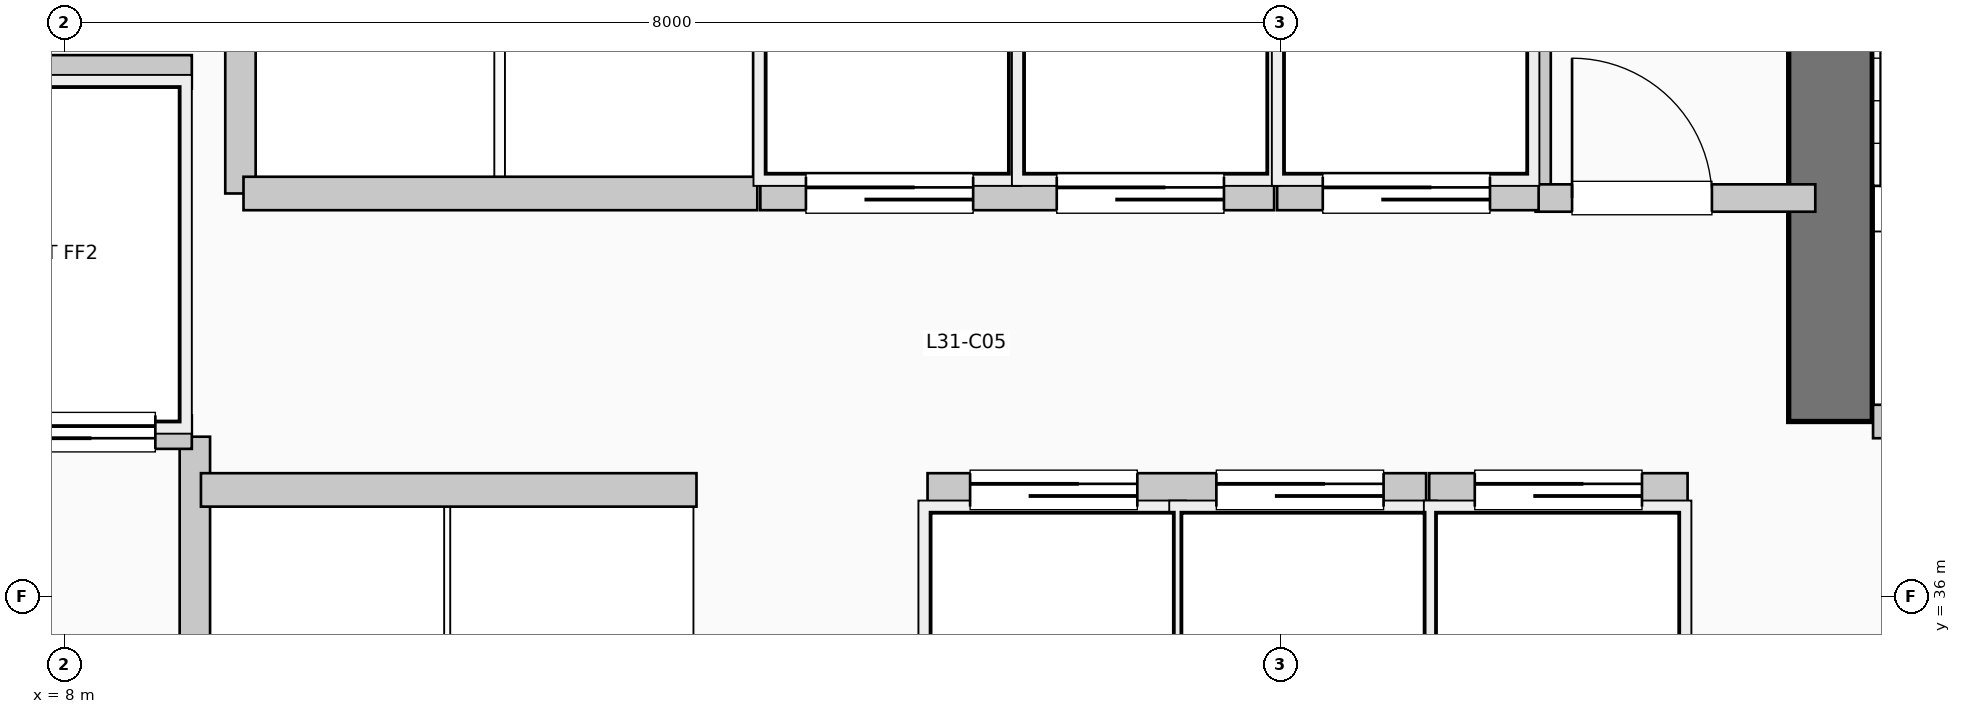
"""IFC4 building model, lengths in metres.
Left out: names, types, materials, properties, quantities, classifications, styles, units other than length and angle.
Written with IfcOpenShell. Run it as: python <this file> out.ifc"""

import sys

from ifc_helpers import new_model, si_unit, direction, frame, frame_2d, origin, place, context, subcontext, project, spatial, rectangle, extrude, element, fill, save


model = new_model("IFC4")
c1 = context("Model", 3, precision=1e-05, world=origin(), true_north=direction((0.0, 1.0)))
c2 = subcontext(c1, "Body", "Model", "MODEL_VIEW")
j1 = project(units=[si_unit("LENGTHUNIT", "METRE"), si_unit("PLANEANGLEUNIT", "RADIAN")], contexts=[c1])
p1 = place(None, origin())
s1 = spatial("IfcSite", under=j1, at=p1, CompositionType="ELEMENT")
p2 = place(p1, origin())
s2 = spatial("IfcBuilding", under=s1, at=p2, CompositionType="ELEMENT")
p3 = place(p2, frame((0.0, 0.0, 130.35)))
s3 = spatial("IfcBuildingStorey", under=s2, at=p3, CompositionType="ELEMENT", Elevation=130.35)
p4 = place(p3, frame((19.62, 37.15, 0.0), z_axis=(0.0, 0.0, 1.0), x_axis=(0.0, 1.0, 0.0)))
e1 = element("IfcWall", 1, at=p4, inside=s3, PredefinedType="SHEAR", context=c2, shape_type="SweptSolid", body=[
    extrude(rectangle(XDim=7.89, YDim=0.55, at=frame_2d((3.945, 0.0))), origin(), (0.0, 0.0, 1.0), 4.62),
])
p5 = place(p3, frame((8.86, 34.55, 0.0), z_axis=(0.0, 0.0, 1.0), x_axis=(0.0, 1.0, 0.0)))
e2 = element("IfcWall", 2, at=p5, inside=s3, PredefinedType="PARTITIONING", context=c2, shape_type="SweptSolid", body=[
    extrude(rectangle(XDim=2.5, YDim=0.2, at=frame_2d((1.25, 0.0))), origin(), (0.0, 0.0, 1.0), 4.37),
])
p6 = place(p3, frame((19.9, 37.15, 0.0), z_axis=(0.0, 0.0, 1.0), x_axis=(1.0, 0.0, 0.0)))
e3 = element("IfcWall", 3, at=p6, inside=s3, PredefinedType="PARTITIONING", context=c2, shape_type="SweptSolid", body=[
    extrude(rectangle(XDim=3.15, YDim=0.22, at=frame_2d((1.575, 0.0))), origin(), (0.0, 0.0, 1.0), 4.37),
])
p7 = place(p6, frame((2.05, 0.0, 0.0), z_axis=(0.0, 0.0, 1.0), x_axis=(-1.0, 0.0, 0.0)))
e4 = element("IfcOpeningElement", 4, at=p7, cuts=e3, PredefinedType="OPENING", context=c2, shape_type="SweptSolid", body=[
    extrude(rectangle(XDim=1.05, YDim=2.15, at=frame_2d((0.525, 1.075))), frame((0.0, 0.12, 0.0), z_axis=(0.0, -1.0, 0.0), x_axis=(1.0, 0.0, 0.0)), (0.0, 0.0, 1.0), 0.24),
])
p8 = place(p3, frame((5.38, 37.08, 0.0), z_axis=(0.0, 0.0, 1.0), x_axis=(1.0, 0.0, 0.0)))
e5 = element("IfcWall", 5, at=p8, inside=s3, PredefinedType="PARTITIONING", context=c2, shape_type="SweptSolid", body=[
    extrude(rectangle(XDim=3.46, YDim=0.22, at=frame_2d((1.73, 0.0))), origin(), (0.0, 0.0, 1.0), 4.37),
])
p9 = place(p8, frame((1.55, 0.0, 0.0), z_axis=(0.0, 0.0, 1.0), x_axis=(-1.0, 0.0, 0.0)))
e6 = element("IfcOpeningElement", 6, at=p9, cuts=e5, PredefinedType="OPENING", context=c2, shape_type="SweptSolid", body=[
    extrude(rectangle(XDim=1.2, YDim=2.2, at=frame_2d((0.6, 1.1))), frame((0.0, 0.12, 0.0), z_axis=(0.0, -1.0, 0.0), x_axis=(1.0, 0.0, 0.0)), (0.0, 0.0, 1.0), 0.24),
])
p10 = place(p8, frame((3.22, 0.0, 0.0), z_axis=(0.0, 0.0, 1.0), x_axis=(-1.0, 0.0, 0.0)))
e7 = element("IfcOpeningElement", 7, at=p10, cuts=e5, PredefinedType="OPENING", context=c2, shape_type="SweptSolid", body=[
    extrude(rectangle(XDim=1.2, YDim=2.2, at=frame_2d((0.6, 1.1))), frame((0.0, 0.12, 0.0), z_axis=(0.0, -1.0, 0.0), x_axis=(1.0, 0.0, 0.0)), (0.0, 0.0, 1.0), 0.24),
])
p11 = place(p3, frame((5.38, 39.45, 0.0), z_axis=(0.0, 0.0, 1.0), x_axis=(1.0, 0.0, 0.0)))
e8 = element("IfcWall", 8, at=p11, inside=s3, PredefinedType="PARTITIONING", context=c2, shape_type="SweptSolid", body=[
    extrude(rectangle(XDim=3.46, YDim=0.22, at=frame_2d((1.73, 0.0))), origin(), (0.0, 0.0, 1.0), 4.37),
])
for number, where, z_axis, x_axis in (
    (9, (9.16, 38.65, 0.0), (0.0, 0.0, 1.0), (0.0, 1.0, 0.0)),
    (10, (17.68, 38.65, 0.0), (0.0, 0.0, 1.0), (0.0, 1.0, 0.0)),
):
    element("IfcWall", number, at=place(p3, frame(where, z_axis=z_axis, x_axis=x_axis)), inside=s3, PredefinedType="PARTITIONING", context=c2, shape_type="SweptSolid", body=[
        extrude(rectangle(XDim=2.35, YDim=0.2, at=frame_2d((1.175, 0.0))), origin(), (0.0, 0.0, 1.0), 4.37),
    ])
p12 = place(p3, frame((17.68, 38.62, 0.0), z_axis=(0.0, 0.0, 1.0), x_axis=(1.0, 0.0, 0.0)))
e11 = element("IfcWall", 11, at=p12, inside=s3, PredefinedType="PARTITIONING", context=c2, shape_type="SweptSolid", body=[
    extrude(rectangle(XDim=1.84, YDim=0.18, at=frame_2d((0.92, 0.0))), origin(), (0.0, 0.0, 1.0), 4.37),
])
p13 = place(p12, frame((0.24, 0.0, 0.0)))
e12 = element("IfcOpeningElement", 12, at=p13, cuts=e11, PredefinedType="OPENING", context=c2, shape_type="SweptSolid", body=[
    extrude(rectangle(XDim=0.92, YDim=2.1, at=frame_2d((0.46, 1.05))), frame((0.0, 0.1, 0.0), z_axis=(0.0, -1.0, 0.0), x_axis=(1.0, 0.0, 0.0)), (0.0, 0.0, 1.0), 0.2),
])
p14 = place(p3, frame((8.9, 36.7, 0.0), z_axis=(0.0, 0.0, 1.0), x_axis=(1.0, 0.0, 0.0)))
e13 = element("IfcWall", 13, at=p14, inside=s3, PredefinedType="PARTITIONING", context=c2, shape_type="SweptSolid", body=[
    extrude(rectangle(XDim=3.26, YDim=0.22, at=frame_2d((1.63, 0.0))), origin(), (0.0, 0.0, 1.0), 4.37),
])
p15 = place(p3, frame((9.18, 38.65, 0.0), z_axis=(0.0, 0.0, 1.0), x_axis=(1.0, 0.0, 0.0)))
e14 = element("IfcWall", 14, at=p15, inside=s3, PredefinedType="PARTITIONING", context=c2, shape_type="SweptSolid", body=[
    extrude(rectangle(XDim=3.38, YDim=0.22, at=frame_2d((1.69, 0.0))), origin(), (0.0, 0.0, 1.0), 4.37),
])
p16 = place(p3, frame((13.68, 36.7, 0.0), z_axis=(0.0, 0.0, 1.0), x_axis=(1.0, 0.0, 0.0)))
e15 = element("IfcWall", 15, at=p16, inside=s3, PredefinedType="PARTITIONING", context=c2, shape_type="SweptSolid", body=[
    extrude(rectangle(XDim=3.28, YDim=0.22, at=frame_2d((1.64, 0.0))), origin(), (0.0, 0.0, 1.0), 4.37),
])
p17 = place(p16, frame((0.28, 0.0, 0.0)))
e16 = element("IfcOpeningElement", 16, at=p17, cuts=e15, PredefinedType="OPENING", context=c2, shape_type="SweptSolid", body=[
    extrude(rectangle(XDim=1.1, YDim=2.2, at=frame_2d((0.55, 1.1))), frame((0.0, 0.12, 0.0), z_axis=(0.0, -1.0, 0.0), x_axis=(1.0, 0.0, 0.0)), (0.0, 0.0, 1.0), 0.24),
])
p18 = place(p16, frame((1.9, 0.0, 0.0)))
e17 = element("IfcOpeningElement", 17, at=p18, cuts=e15, PredefinedType="OPENING", context=c2, shape_type="SweptSolid", body=[
    extrude(rectangle(XDim=1.1, YDim=2.2, at=frame_2d((0.55, 1.1))), frame((0.0, 0.12, 0.0), z_axis=(0.0, -1.0, 0.0), x_axis=(1.0, 0.0, 0.0)), (0.0, 0.0, 1.0), 0.24),
])
p19 = place(p3, frame((12.58, 38.65, 0.0), z_axis=(0.0, 0.0, 1.0), x_axis=(1.0, 0.0, 0.0)))
e18 = element("IfcWall", 18, at=p19, inside=s3, PredefinedType="PARTITIONING", context=c2, shape_type="SweptSolid", body=[
    extrude(rectangle(XDim=3.38, YDim=0.22, at=frame_2d((1.69, 0.0))), origin(), (0.0, 0.0, 1.0), 4.37),
])
p20 = place(p19, frame((0.3, 0.0, 0.0)))
e19 = element("IfcOpeningElement", 19, at=p20, cuts=e18, PredefinedType="OPENING", context=c2, shape_type="SweptSolid", body=[
    extrude(rectangle(XDim=1.1, YDim=2.2, at=frame_2d((0.55, 1.1))), frame((0.0, 0.12, 0.0), z_axis=(0.0, -1.0, 0.0), x_axis=(1.0, 0.0, 0.0)), (0.0, 0.0, 1.0), 0.24),
])
p21 = place(p19, frame((1.95, 0.0, 0.0)))
e20 = element("IfcOpeningElement", 20, at=p21, cuts=e18, PredefinedType="OPENING", context=c2, shape_type="SweptSolid", body=[
    extrude(rectangle(XDim=1.1, YDim=2.2, at=frame_2d((0.55, 1.1))), frame((0.0, 0.12, 0.0), z_axis=(0.0, -1.0, 0.0), x_axis=(1.0, 0.0, 0.0)), (0.0, 0.0, 1.0), 0.24),
])
p22 = place(p3, frame((16.98, 36.7, 0.0), z_axis=(0.0, 0.0, 1.0), x_axis=(1.0, 0.0, 0.0)))
e21 = element("IfcWall", 21, at=p22, inside=s3, PredefinedType="PARTITIONING", context=c2, shape_type="SweptSolid", body=[
    extrude(rectangle(XDim=1.7, YDim=0.22, at=frame_2d((0.85, 0.0))), origin(), (0.0, 0.0, 1.0), 4.37),
])
p23 = place(p22, frame((0.3, 0.0, 0.0)))
e22 = element("IfcOpeningElement", 22, at=p23, cuts=e21, PredefinedType="OPENING", context=c2, shape_type="SweptSolid", body=[
    extrude(rectangle(XDim=1.1, YDim=2.2, at=frame_2d((0.55, 1.1))), frame((0.0, 0.12, 0.0), z_axis=(0.0, -1.0, 0.0), x_axis=(1.0, 0.0, 0.0)), (0.0, 0.0, 1.0), 0.24),
])
p24 = place(p3, frame((15.98, 38.65, 0.0), z_axis=(0.0, 0.0, 1.0), x_axis=(1.0, 0.0, 0.0)))
e23 = element("IfcWall", 23, at=p24, inside=s3, PredefinedType="PARTITIONING", context=c2, shape_type="SweptSolid", body=[
    extrude(rectangle(XDim=1.72, YDim=0.22, at=frame_2d((0.86, 0.0))), origin(), (0.0, 0.0, 1.0), 4.37),
])
p25 = place(p24, frame((0.3, 0.0, 0.0)))
e24 = element("IfcOpeningElement", 24, at=p25, cuts=e23, PredefinedType="OPENING", context=c2, shape_type="SweptSolid", body=[
    extrude(rectangle(XDim=1.1, YDim=2.2, at=frame_2d((0.55, 1.1))), frame((0.0, 0.12, 0.0), z_axis=(0.0, -1.0, 0.0), x_axis=(1.0, 0.0, 0.0)), (0.0, 0.0, 1.0), 0.24),
])
p26 = place(p10, origin())
e25 = element("IfcDoor", 25, at=p26, inside=s3, OperationType="SLIDING_TO_RIGHT", PredefinedType="DOOR", context=c2, shape_type="SweptSolid", body=[
    extrude(rectangle(XDim=1.2, YDim=2.2, at=frame_2d((0.6, 1.1))), frame((0.0, 0.025, 0.0), z_axis=(0.0, -1.0, 0.0), x_axis=(1.0, 0.0, 0.0)), (0.0, 0.0, 1.0), 0.05),
])
fill(e7, e25)
p27 = place(p13, origin())
e26 = element("IfcDoor", 26, at=p27, inside=s3, OperationType="SINGLE_SWING_LEFT", PredefinedType="DOOR", context=c2, shape_type="SweptSolid", body=[
    extrude(rectangle(XDim=0.92, YDim=2.1, at=frame_2d((0.46, 1.05))), frame((0.0, 0.025, 0.0), z_axis=(0.0, -1.0, 0.0), x_axis=(1.0, 0.0, 0.0)), (0.0, 0.0, 1.0), 0.05),
])
fill(e12, e26)
p28 = place(p17, origin())
e27 = element("IfcDoor", 27, at=p28, inside=s3, OperationType="SLIDING_TO_RIGHT", PredefinedType="DOOR", context=c2, shape_type="SweptSolid", body=[
    extrude(rectangle(XDim=1.1, YDim=2.2, at=frame_2d((0.55, 1.1))), frame((0.0, 0.025, 0.0), z_axis=(0.0, -1.0, 0.0), x_axis=(1.0, 0.0, 0.0)), (0.0, 0.0, 1.0), 0.05),
])
fill(e16, e27)
p29 = place(p18, origin())
e28 = element("IfcDoor", 28, at=p29, inside=s3, OperationType="SLIDING_TO_RIGHT", PredefinedType="DOOR", context=c2, shape_type="SweptSolid", body=[
    extrude(rectangle(XDim=1.1, YDim=2.2, at=frame_2d((0.55, 1.1))), frame((0.0, 0.025, 0.0), z_axis=(0.0, -1.0, 0.0), x_axis=(1.0, 0.0, 0.0)), (0.0, 0.0, 1.0), 0.05),
])
fill(e17, e28)
p30 = place(p20, origin())
e29 = element("IfcDoor", 29, at=p30, inside=s3, OperationType="SLIDING_TO_RIGHT", PredefinedType="DOOR", context=c2, shape_type="SweptSolid", body=[
    extrude(rectangle(XDim=1.1, YDim=2.2, at=frame_2d((0.55, 1.1))), frame((0.0, 0.025, 0.0), z_axis=(0.0, -1.0, 0.0), x_axis=(1.0, 0.0, 0.0)), (0.0, 0.0, 1.0), 0.05),
])
fill(e19, e29)
p31 = place(p21, origin())
e30 = element("IfcDoor", 30, at=p31, inside=s3, OperationType="SLIDING_TO_RIGHT", PredefinedType="DOOR", context=c2, shape_type="SweptSolid", body=[
    extrude(rectangle(XDim=1.1, YDim=2.2, at=frame_2d((0.55, 1.1))), frame((0.0, 0.025, 0.0), z_axis=(0.0, -1.0, 0.0), x_axis=(1.0, 0.0, 0.0)), (0.0, 0.0, 1.0), 0.05),
])
fill(e20, e30)
p32 = place(p23, origin())
e31 = element("IfcDoor", 31, at=p32, inside=s3, OperationType="SLIDING_TO_LEFT", PredefinedType="DOOR", context=c2, shape_type="SweptSolid", body=[
    extrude(rectangle(XDim=1.1, YDim=2.2, at=frame_2d((0.55, 1.1))), frame((0.0, 0.025, 0.0), z_axis=(0.0, -1.0, 0.0), x_axis=(1.0, 0.0, 0.0)), (0.0, 0.0, 1.0), 0.05),
])
fill(e22, e31)
p33 = place(p25, origin())
e32 = element("IfcDoor", 32, at=p33, inside=s3, OperationType="SLIDING_TO_LEFT", PredefinedType="DOOR", context=c2, shape_type="SweptSolid", body=[
    extrude(rectangle(XDim=1.1, YDim=2.2, at=frame_2d((0.55, 1.1))), frame((0.0, 0.025, 0.0), z_axis=(0.0, -1.0, 0.0), x_axis=(1.0, 0.0, 0.0)), (0.0, 0.0, 1.0), 0.05),
])
fill(e24, e32)
save(model, sys.argv[1])
